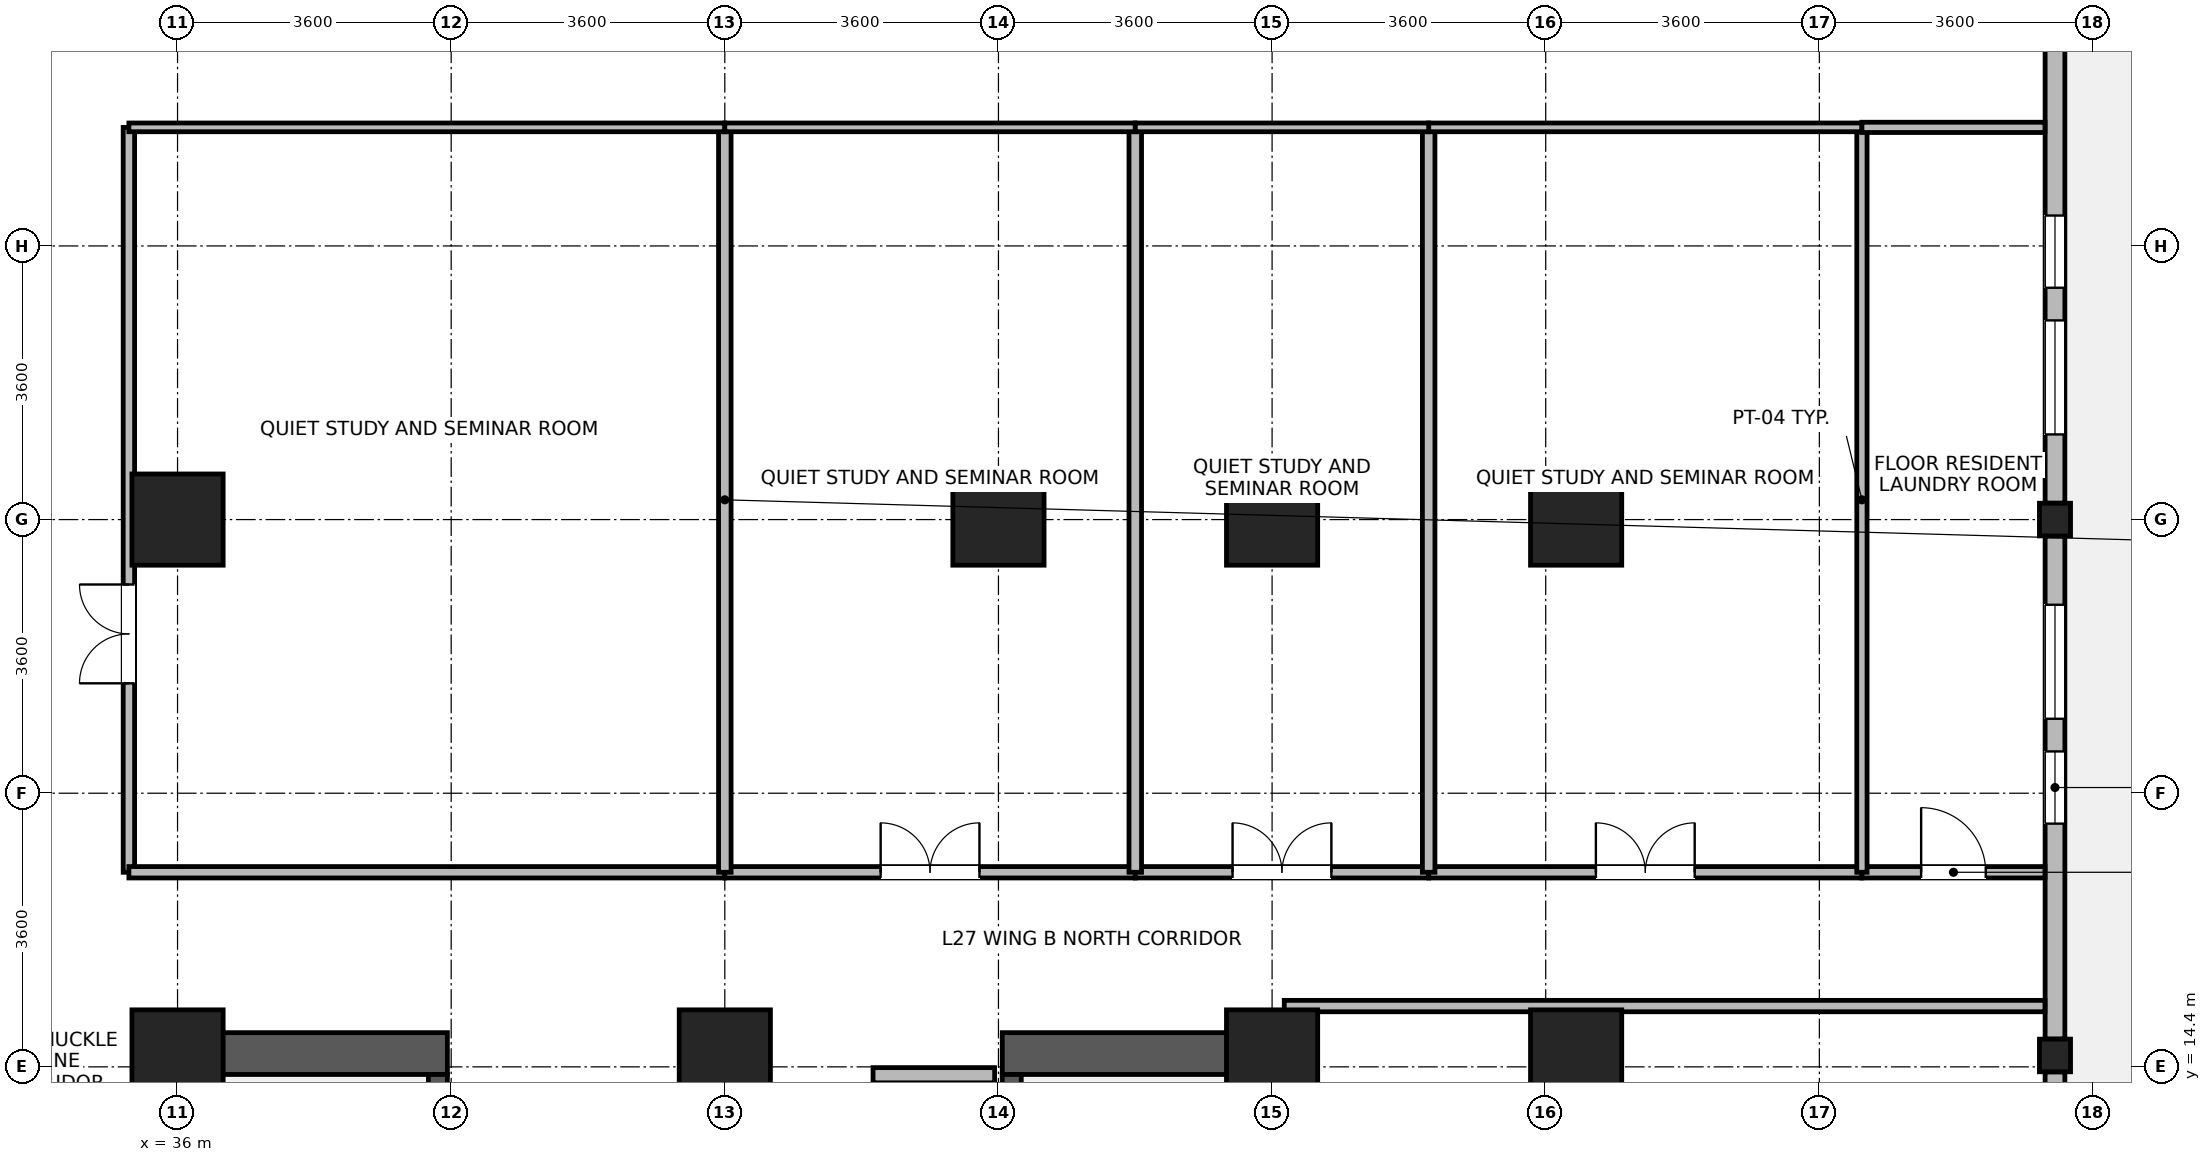
"""IFC4 building model, lengths in metres.
Left out: names, types, materials, properties, quantities, classifications, styles, units other than length and angle.
Written with IfcOpenShell. Run it as: python <this file> out.ifc"""

import sys

from ifc_helpers import new_model, si_unit, direction, frame, frame_2d, origin, origin_2d, place, context, subcontext, project, spatial, rectangle, i_section, extrude, source, transform, mapped, element, fill, save


model = new_model("IFC4")
c1 = context("Model", 3, precision=1e-05, world=origin(), true_north=direction((0.0, 1.0)))
c2 = subcontext(c1, "Body", "Model", "MODEL_VIEW")
j1 = project(units=[si_unit("LENGTHUNIT", "METRE"), si_unit("PLANEANGLEUNIT", "RADIAN")], contexts=[c1])
p1 = place(None, origin())
s1 = spatial("IfcSite", under=j1, at=p1, CompositionType="ELEMENT")
p2 = place(p1, origin())
s2 = spatial("IfcBuilding", under=s1, at=p2, CompositionType="ELEMENT")
p3 = place(p2, frame((0.0, 0.0, 108.2)))
s3 = spatial("IfcBuildingStorey", under=s2, at=p3, CompositionType="ELEMENT", Elevation=108.2)
for number, where, z_axis, x_axis in (
    (1, (36.075, 6.75, 0.0), (0.0, 0.0, 1.0), (0.0, 1.0, 0.0)),
    (2, (50.325, 6.75, 0.0), (0.0, 0.0, 1.0), (0.0, 1.0, 0.0)),
):
    element("IfcWall", number, at=place(p3, frame(where, z_axis=z_axis, x_axis=x_axis)), inside=s3, PredefinedType="SHEAR", context=c2, shape_type="SweptSolid", body=[
        extrude(rectangle(XDim=8.1, YDim=0.55, at=frame_2d((4.05, 0.0))), origin(), (0.0, 0.0, 1.0), 3.45),
    ])
for number, where, z_axis, x_axis in (
    (3, (36.35, 14.575, 0.0), (0.0, 0.0, 1.0), (1.0, 0.0, 0.0)),
    (4, (46.85, 14.575, 0.0), (0.0, 0.0, 1.0), (1.0, 0.0, 0.0)),
):
    element("IfcWall", number, at=place(p3, frame(where, z_axis=z_axis, x_axis=x_axis)), inside=s3, PredefinedType="SHEAR", context=c2, shape_type="SweptSolid", body=[
        extrude(rectangle(XDim=3.2, YDim=0.55, at=frame_2d((1.6, 0.0))), origin(), (0.0, 0.0, 1.0), 3.45),
    ])
p4 = place(p3, frame((39.425, 7.3, 0.0), z_axis=(0.0, 0.0, 1.0), x_axis=(0.0, 1.0, 0.0)))
e5 = element("IfcWall", 5, at=p4, inside=s3, PredefinedType="SHEAR", context=c2, shape_type="SweptSolid", body=[
    extrude(rectangle(XDim=7.0, YDim=0.25, at=frame_2d((3.5, 0.0))), origin(), (0.0, 0.0, 1.0), 3.45),
])
p5 = place(p4, frame((0.15, 0.0, 0.0)))
e6 = element("IfcOpeningElement", 6, at=p5, cuts=e5, PredefinedType="OPENING", context=c2, shape_type="SweptSolid", body=[
    extrude(rectangle(XDim=1.1, YDim=2.08, at=frame_2d((0.55, 1.04))), frame((0.0, 0.135, 0.0), z_axis=(0.0, -1.0, 0.0), x_axis=(1.0, 0.0, 0.0)), (0.0, 0.0, 1.0), 0.27),
])
p6 = place(p3, frame((46.975, 7.3, 0.0), z_axis=(0.0, 0.0, 1.0), x_axis=(0.0, 1.0, 0.0)))
e7 = element("IfcWall", 7, at=p6, inside=s3, PredefinedType="SHEAR", context=c2, shape_type="SweptSolid", body=[
    extrude(rectangle(XDim=7.0, YDim=0.25, at=frame_2d((3.5, 0.0))), origin(), (0.0, 0.0, 1.0), 3.45),
])
p7 = place(p6, frame((0.15, 0.0, 0.0)))
e8 = element("IfcOpeningElement", 8, at=p7, cuts=e7, PredefinedType="OPENING", context=c2, shape_type="SweptSolid", body=[
    extrude(rectangle(XDim=1.1, YDim=2.08, at=frame_2d((0.55, 1.04))), frame((0.0, 0.135, 0.0), z_axis=(0.0, -1.0, 0.0), x_axis=(1.0, 0.0, 0.0)), (0.0, 0.0, 1.0), 0.27),
])
m1 = source(origin(), c2, "Body", "SweptSolid", [
    extrude(rectangle(XDim=1.2, YDim=1.2, at=origin_2d()), origin(), (0.0, 0.0, 1.0), 3.7),
])
for number, where, z_axis, x_axis in (
    (9, (36.0, 21.6, 0.0), (0.0, 0.0, 1.0), (1.0, 0.0, 0.0)),
    (10, (46.8, 21.6, 0.0), (0.0, 0.0, 1.0), (1.0, 0.0, 0.0)),
    (11, (36.0, 14.55, 0.0), (0.0, 0.0, 1.0), (1.0, 0.0, 0.0)),
    (12, (43.2, 14.55, 0.0), (0.0, 0.0, 1.0), (1.0, 0.0, 0.0)),
    (13, (50.4, 14.55, 0.0), (0.0, 0.0, 1.0), (1.0, 0.0, 0.0)),
    (14, (50.4, 21.6, 0.0), (0.0, 0.0, 1.0), (1.0, 0.0, 0.0)),
    (15, (54.4, 14.55, 0.0), (0.0, 0.0, 1.0), (1.0, 0.0, 0.0)),
    (16, (54.4, 21.6, 0.0), (0.0, 0.0, 1.0), (1.0, 0.0, 0.0)),
):
    element("IfcColumn", number, at=place(p3, frame(where, z_axis=z_axis, x_axis=x_axis)), inside=s3, PredefinedType="COLUMN", context=c2, shape_type="MappedRepresentation", body=[
        mapped(m1, transform((0.0, 0.0, 0.0), x_axis=(1.0, 0.0, 0.0), y_axis=(0.0, 1.0, 0.0), z_axis=(0.0, 0.0, 1.0), scale=1.0)),
    ])
m2 = source(origin(), c2, "Body", "SweptSolid", [
    extrude(i_section(OverallWidth=0.409, OverallDepth=0.43, WebThickness=0.024, FlangeThickness=0.033, FilletRadius=0.015, at=origin_2d()), origin(), (0.0, 0.0, 1.0), 3.7),
])
for number, where, z_axis, x_axis in (
    (17, (60.7, 14.55, 0.0), (0.0, 0.0, 1.0), (1.0, 0.0, 0.0)),
    (18, (60.7, 21.6, 0.0), (0.0, 0.0, 1.0), (1.0, 0.0, 0.0)),
):
    element("IfcColumn", number, at=place(p3, frame(where, z_axis=z_axis, x_axis=x_axis)), inside=s3, PredefinedType="COLUMN", context=c2, shape_type="MappedRepresentation", body=[
        mapped(m2, transform((0.0, 0.0, 0.0), x_axis=(1.0, 0.0, 0.0), y_axis=(0.0, 1.0, 0.0), z_axis=(0.0, 0.0, 1.0), scale=1.0)),
    ])
p8 = place(p3, frame((60.7, 14.334, 0.0), z_axis=(0.0, 0.0, 1.0), x_axis=(0.0, -1.0, 0.0)))
e19 = element("IfcWall", 19, at=p8, inside=s3, PredefinedType="STANDARD", context=c2, shape_type="SweptSolid", body=[
    extrude(rectangle(XDim=7.068, YDim=0.26, at=frame_2d((3.534, 0.0))), origin(), (0.0, 0.0, 1.0), 2.98),
])
p9 = place(p8, frame((2.784, 0.0, 0.0)))
e20 = element("IfcOpeningElement", 20, at=p9, cuts=e19, PredefinedType="OPENING", context=c2, shape_type="SweptSolid", body=[
    extrude(rectangle(XDim=1.5, YDim=2.15, at=frame_2d((0.75, 1.075))), frame((0.0, 0.14, 0.0), z_axis=(0.0, -1.0, 0.0), x_axis=(1.0, 0.0, 0.0)), (0.0, 0.0, 1.0), 0.28),
])
p10 = place(p8, frame((1.017, 0.0, 0.85)))
e21 = element("IfcOpeningElement", 21, at=p10, cuts=e19, PredefinedType="OPENING", context=c2, shape_type="SweptSolid", body=[
    extrude(rectangle(XDim=1.5, YDim=1.85, at=frame_2d((0.75, 0.925))), frame((0.0, 0.14, 0.0), z_axis=(0.0, -1.0, 0.0), x_axis=(1.0, 0.0, 0.0)), (0.0, 0.0, 1.0), 0.28),
])
p11 = place(p8, frame((4.551, 0.0, 0.85)))
e22 = element("IfcOpeningElement", 22, at=p11, cuts=e19, PredefinedType="OPENING", context=c2, shape_type="SweptSolid", body=[
    extrude(rectangle(XDim=1.5, YDim=1.85, at=frame_2d((0.75, 0.925))), frame((0.0, 0.14, 0.0), z_axis=(0.0, -1.0, 0.0), x_axis=(1.0, 0.0, 0.0)), (0.0, 0.0, 1.0), 0.28),
])
p12 = place(p3, frame((60.7, 21.384, 0.0), z_axis=(0.0, 0.0, 1.0), x_axis=(0.0, -1.0, 0.0)))
e23 = element("IfcWall", 23, at=p12, inside=s3, PredefinedType="STANDARD", context=c2, shape_type="SweptSolid", body=[
    extrude(rectangle(XDim=6.618, YDim=0.26, at=frame_2d((3.309, 0.0))), origin(), (0.0, 0.0, 1.0), 2.98),
])
p13 = place(p12, frame((0.905, 0.0, 0.85)))
e24 = element("IfcOpeningElement", 24, at=p13, cuts=e23, PredefinedType="OPENING", context=c2, shape_type="SweptSolid", body=[
    extrude(rectangle(XDim=1.5, YDim=1.85, at=frame_2d((0.75, 0.925))), frame((0.0, 0.14, 0.0), z_axis=(0.0, -1.0, 0.0), x_axis=(1.0, 0.0, 0.0)), (0.0, 0.0, 1.0), 0.28),
])
p14 = place(p12, frame((2.834, 0.0, 0.85)))
e25 = element("IfcOpeningElement", 25, at=p14, cuts=e23, PredefinedType="OPENING", context=c2, shape_type="SweptSolid", body=[
    extrude(rectangle(XDim=0.95, YDim=1.75, at=frame_2d((0.475, 0.875))), frame((0.0, 0.14, 0.0), z_axis=(0.0, -1.0, 0.0), x_axis=(1.0, 0.0, 0.0)), (0.0, 0.0, 1.0), 0.28),
])
p15 = place(p3, frame((60.7, 28.434, 0.0), z_axis=(0.0, 0.0, 1.0), x_axis=(0.0, -1.0, 0.0)))
e26 = element("IfcWall", 26, at=p15, inside=s3, PredefinedType="STANDARD", context=c2, shape_type="SweptSolid", body=[
    extrude(rectangle(XDim=6.618, YDim=0.26, at=frame_2d((3.309, 0.0))), origin(), (0.0, 0.0, 1.0), 2.98),
])
p16 = place(p15, frame((4.213, 0.0, 0.85)))
e27 = element("IfcOpeningElement", 27, at=p16, cuts=e26, PredefinedType="OPENING", context=c2, shape_type="SweptSolid", body=[
    extrude(rectangle(XDim=1.5, YDim=1.85, at=frame_2d((0.75, 0.925))), frame((0.0, 0.14, 0.0), z_axis=(0.0, -1.0, 0.0), x_axis=(1.0, 0.0, 0.0)), (0.0, 0.0, 1.0), 0.28),
])
p17 = place(p15, frame((2.834, 0.0, 0.85)))
e28 = element("IfcOpeningElement", 28, at=p17, cuts=e26, PredefinedType="OPENING", context=c2, shape_type="SweptSolid", body=[
    extrude(rectangle(XDim=0.95, YDim=1.75, at=frame_2d((0.475, 0.875))), frame((0.0, 0.14, 0.0), z_axis=(0.0, -1.0, 0.0), x_axis=(1.0, 0.0, 0.0)), (0.0, 0.0, 1.0), 0.28),
])
p18 = place(p3, frame((45.15, 14.29, 0.0), z_axis=(0.0, 0.0, 1.0), x_axis=(1.0, 0.0, 0.0)))
e29 = element("IfcWall", 29, at=p18, inside=s3, PredefinedType="PARTITIONING", context=c2, shape_type="SweptSolid", body=[
    extrude(rectangle(XDim=1.6, YDim=0.2, at=frame_2d((0.8, 0.0))), origin(), (0.0, 0.0, 1.0), 2.43),
])
p19 = place(p3, frame((50.56, 15.2, 0.0), z_axis=(0.0, 0.0, 1.0), x_axis=(1.0, 0.0, 0.0)))
e30 = element("IfcWall", 30, at=p19, inside=s3, PredefinedType="PARTITIONING", context=c2, shape_type="SweptSolid", body=[
    extrude(rectangle(XDim=10.008, YDim=0.15, at=frame_2d((5.004, 0.0))), origin(), (0.0, 0.0, 1.0), 3.43),
])
p20 = place(p3, frame((35.36, 16.96, 0.0), z_axis=(0.0, 0.0, 1.0), x_axis=(0.0, 1.0, 0.0)))
e31 = element("IfcWall", 31, at=p20, inside=s3, PredefinedType="PARTITIONING", context=c2, shape_type="SweptSolid", body=[
    extrude(rectangle(XDim=9.8, YDim=0.15, at=frame_2d((4.9, 0.0))), origin(), (0.0, 0.0, 1.0), 3.43),
])
p21 = place(p20, frame((2.486, 0.0, 0.0)))
e32 = element("IfcOpeningElement", 32, at=p21, cuts=e31, PredefinedType="OPENING", context=c2, shape_type="SweptSolid", body=[
    extrude(rectangle(XDim=1.3, YDim=2.12, at=frame_2d((0.65, 1.06))), frame((0.0, 0.085, 0.0), z_axis=(0.0, -1.0, 0.0), x_axis=(1.0, 0.0, 0.0)), (0.0, 0.0, 1.0), 0.17),
])
p22 = place(p3, frame((35.36, 16.96, 0.0), z_axis=(0.0, 0.0, 1.0), x_axis=(1.0, 0.0, 0.0)))
e33 = element("IfcWall", 33, at=p22, inside=s3, PredefinedType="PARTITIONING", context=c2, shape_type="SweptSolid", body=[
    extrude(rectangle(XDim=7.84, YDim=0.15, at=frame_2d((3.92, 0.0))), origin(), (0.0, 0.0, 1.0), 3.43),
])
p23 = place(p3, frame((52.46, 16.96, 0.0), z_axis=(0.0, 0.0, 1.0), x_axis=(1.0, 0.0, 0.0)))
e34 = element("IfcWall", 34, at=p23, inside=s3, PredefinedType="PARTITIONING", context=c2, shape_type="SweptSolid", body=[
    extrude(rectangle(XDim=5.7, YDim=0.15, at=frame_2d((2.85, 0.0))), origin(), (0.0, 0.0, 1.0), 3.43),
])
p24 = place(p23, frame((2.2, 0.0, 0.0)))
e35 = element("IfcOpeningElement", 35, at=p24, cuts=e34, PredefinedType="OPENING", context=c2, shape_type="SweptSolid", body=[
    extrude(rectangle(XDim=1.3, YDim=2.12, at=frame_2d((0.65, 1.06))), frame((0.0, 0.085, 0.0), z_axis=(0.0, -1.0, 0.0), x_axis=(1.0, 0.0, 0.0)), (0.0, 0.0, 1.0), 0.17),
])
p25 = place(p3, frame((43.2, 16.96, 0.0), z_axis=(0.0, 0.0, 1.0), x_axis=(1.0, 0.0, 0.0)))
e36 = element("IfcWall", 36, at=p25, inside=s3, PredefinedType="PARTITIONING", context=c2, shape_type="SweptSolid", body=[
    extrude(rectangle(XDim=5.4, YDim=0.15, at=frame_2d((2.7, 0.0))), origin(), (0.0, 0.0, 1.0), 3.43),
])
p26 = place(p25, frame((2.05, 0.0, 0.0)))
e37 = element("IfcOpeningElement", 37, at=p26, cuts=e36, PredefinedType="OPENING", context=c2, shape_type="SweptSolid", body=[
    extrude(rectangle(XDim=1.3, YDim=2.12, at=frame_2d((0.65, 1.06))), frame((0.0, 0.085, 0.0), z_axis=(0.0, -1.0, 0.0), x_axis=(1.0, 0.0, 0.0)), (0.0, 0.0, 1.0), 0.17),
])
p27 = place(p3, frame((48.6, 16.96, 0.0), z_axis=(0.0, 0.0, 1.0), x_axis=(1.0, 0.0, 0.0)))
e38 = element("IfcWall", 38, at=p27, inside=s3, PredefinedType="PARTITIONING", context=c2, shape_type="SweptSolid", body=[
    extrude(rectangle(XDim=3.86, YDim=0.15, at=frame_2d((1.93, 0.0))), origin(), (0.0, 0.0, 1.0), 3.43),
])
p28 = place(p27, frame((1.28, 0.0, 0.0)))
e39 = element("IfcOpeningElement", 39, at=p28, cuts=e38, PredefinedType="OPENING", context=c2, shape_type="SweptSolid", body=[
    extrude(rectangle(XDim=1.3, YDim=2.12, at=frame_2d((0.65, 1.06))), frame((0.0, 0.085, 0.0), z_axis=(0.0, -1.0, 0.0), x_axis=(1.0, 0.0, 0.0)), (0.0, 0.0, 1.0), 0.17),
])
p29 = place(p3, frame((58.16, 16.96, 0.0), z_axis=(0.0, 0.0, 1.0), x_axis=(1.0, 0.0, 0.0)))
e40 = element("IfcWall", 40, at=p29, inside=s3, PredefinedType="PARTITIONING", context=c2, shape_type="SweptSolid", body=[
    extrude(rectangle(XDim=2.408, YDim=0.15, at=frame_2d((1.204, 0.0))), origin(), (0.0, 0.0, 1.0), 3.43),
])
p30 = place(p29, frame((0.779, 0.0, 0.0)))
e41 = element("IfcOpeningElement", 41, at=p30, cuts=e40, PredefinedType="OPENING", context=c2, shape_type="SweptSolid", body=[
    extrude(rectangle(XDim=0.85, YDim=2.04, at=frame_2d((0.425, 1.02))), frame((0.0, 0.085, 0.0), z_axis=(0.0, -1.0, 0.0), x_axis=(1.0, 0.0, 0.0)), (0.0, 0.0, 1.0), 0.17),
])
for number, where, z_axis, x_axis in (
    (42, (43.2, 16.96, 0.0), (0.0, 0.0, 1.0), (0.0, 1.0, 0.0)),
    (43, (48.6, 16.96, 0.0), (0.0, 0.0, 1.0), (0.0, 1.0, 0.0)),
    (44, (52.46, 16.96, 0.0), (0.0, 0.0, 1.0), (0.0, 1.0, 0.0)),
):
    element("IfcWall", number, at=place(p3, frame(where, z_axis=z_axis, x_axis=x_axis)), inside=s3, PredefinedType="PARTITIONING", context=c2, shape_type="SweptSolid", body=[
        extrude(rectangle(XDim=9.8, YDim=0.165, at=frame_2d((4.9, 0.0))), origin(), (0.0, 0.0, 1.0), 3.43),
    ])
p31 = place(p3, frame((58.16, 16.96, 0.0), z_axis=(0.0, 0.0, 1.0), x_axis=(0.0, 1.0, 0.0)))
e45 = element("IfcWall", 45, at=p31, inside=s3, PredefinedType="PARTITIONING", context=c2, shape_type="SweptSolid", body=[
    extrude(rectangle(XDim=9.8, YDim=0.135, at=frame_2d((4.9, 0.0))), origin(), (0.0, 0.0, 1.0), 3.43),
])
p32 = place(p3, frame((35.36, 26.76, 0.0), z_axis=(0.0, 0.0, 1.0), x_axis=(1.0, 0.0, 0.0)))
e46 = element("IfcWall", 46, at=p32, inside=s3, PredefinedType="PARTITIONING", context=c2, shape_type="SweptSolid", body=[
    extrude(rectangle(XDim=7.84, YDim=0.115, at=frame_2d((3.92, 0.0))), origin(), (0.0, 0.0, 1.0), 3.43),
])
p33 = place(p3, frame((52.46, 26.76, 0.0), z_axis=(0.0, 0.0, 1.0), x_axis=(1.0, 0.0, 0.0)))
e47 = element("IfcWall", 47, at=p33, inside=s3, PredefinedType="PARTITIONING", context=c2, shape_type="SweptSolid", body=[
    extrude(rectangle(XDim=5.7, YDim=0.115, at=frame_2d((2.85, 0.0))), origin(), (0.0, 0.0, 1.0), 3.43),
])
p34 = place(p3, frame((43.2, 26.76, 0.0), z_axis=(0.0, 0.0, 1.0), x_axis=(1.0, 0.0, 0.0)))
e48 = element("IfcWall", 48, at=p34, inside=s3, PredefinedType="PARTITIONING", context=c2, shape_type="SweptSolid", body=[
    extrude(rectangle(XDim=5.4, YDim=0.115, at=frame_2d((2.7, 0.0))), origin(), (0.0, 0.0, 1.0), 3.43),
])
p35 = place(p3, frame((48.6, 26.76, 0.0), z_axis=(0.0, 0.0, 1.0), x_axis=(1.0, 0.0, 0.0)))
e49 = element("IfcWall", 49, at=p35, inside=s3, PredefinedType="PARTITIONING", context=c2, shape_type="SweptSolid", body=[
    extrude(rectangle(XDim=3.86, YDim=0.115, at=frame_2d((1.93, 0.0))), origin(), (0.0, 0.0, 1.0), 3.43),
])
p36 = place(p3, frame((58.16, 26.76, 0.0), z_axis=(0.0, 0.0, 1.0), x_axis=(1.0, 0.0, 0.0)))
e50 = element("IfcWall", 50, at=p36, inside=s3, PredefinedType="PARTITIONING", context=c2, shape_type="SweptSolid", body=[
    extrude(rectangle(XDim=2.408, YDim=0.135, at=frame_2d((1.204, 0.0))), origin(), (0.0, 0.0, 1.0), 3.43),
])
p37 = place(p13, origin())
e51 = element("IfcWindow", 51, at=p37, inside=s3, PartitioningType="SINGLE_PANEL", PredefinedType="WINDOW", context=c2, shape_type="SweptSolid", body=[
    extrude(rectangle(XDim=1.5, YDim=1.85, at=frame_2d((0.75, 0.925))), frame((0.0, 0.03, 0.0), z_axis=(0.0, -1.0, 0.0), x_axis=(1.0, 0.0, 0.0)), (0.0, 0.0, 1.0), 0.06),
])
fill(e24, e51)
p38 = place(p14, origin())
e52 = element("IfcWindow", 52, at=p38, inside=s3, PartitioningType="SINGLE_PANEL", PredefinedType="WINDOW", context=c2, shape_type="SweptSolid", body=[
    extrude(rectangle(XDim=0.95, YDim=1.75, at=frame_2d((0.475, 0.875))), frame((0.0, 0.03, 0.0), z_axis=(0.0, -1.0, 0.0), x_axis=(1.0, 0.0, 0.0)), (0.0, 0.0, 1.0), 0.06),
])
fill(e25, e52)
p39 = place(p16, origin())
e53 = element("IfcWindow", 53, at=p39, inside=s3, PartitioningType="SINGLE_PANEL", PredefinedType="WINDOW", context=c2, shape_type="SweptSolid", body=[
    extrude(rectangle(XDim=1.5, YDim=1.85, at=frame_2d((0.75, 0.925))), frame((0.0, 0.03, 0.0), z_axis=(0.0, -1.0, 0.0), x_axis=(1.0, 0.0, 0.0)), (0.0, 0.0, 1.0), 0.06),
])
fill(e27, e53)
p40 = place(p17, origin())
e54 = element("IfcWindow", 54, at=p40, inside=s3, PartitioningType="SINGLE_PANEL", PredefinedType="WINDOW", context=c2, shape_type="SweptSolid", body=[
    extrude(rectangle(XDim=0.95, YDim=1.75, at=frame_2d((0.475, 0.875))), frame((0.0, 0.03, 0.0), z_axis=(0.0, -1.0, 0.0), x_axis=(1.0, 0.0, 0.0)), (0.0, 0.0, 1.0), 0.06),
])
fill(e28, e54)
p41 = place(p21, origin())
e55 = element("IfcDoor", 55, at=p41, inside=s3, OperationType="DOUBLE_DOOR_SINGLE_SWING", PredefinedType="DOOR", context=c2, shape_type="SweptSolid", body=[
    extrude(rectangle(XDim=1.3, YDim=2.12, at=frame_2d((0.65, 1.06))), frame((0.0, 0.025, 0.0), z_axis=(0.0, -1.0, 0.0), x_axis=(1.0, 0.0, 0.0)), (0.0, 0.0, 1.0), 0.05),
])
fill(e32, e55)
p42 = place(p24, origin())
e56 = element("IfcDoor", 56, at=p42, inside=s3, OperationType="DOUBLE_DOOR_SINGLE_SWING", PredefinedType="DOOR", context=c2, shape_type="SweptSolid", body=[
    extrude(rectangle(XDim=1.3, YDim=2.12, at=frame_2d((0.65, 1.06))), frame((0.0, 0.025, 0.0), z_axis=(0.0, -1.0, 0.0), x_axis=(1.0, 0.0, 0.0)), (0.0, 0.0, 1.0), 0.05),
])
fill(e35, e56)
p43 = place(p26, origin())
e57 = element("IfcDoor", 57, at=p43, inside=s3, OperationType="DOUBLE_DOOR_SINGLE_SWING", PredefinedType="DOOR", context=c2, shape_type="SweptSolid", body=[
    extrude(rectangle(XDim=1.3, YDim=2.12, at=frame_2d((0.65, 1.06))), frame((0.0, 0.025, 0.0), z_axis=(0.0, -1.0, 0.0), x_axis=(1.0, 0.0, 0.0)), (0.0, 0.0, 1.0), 0.05),
])
fill(e37, e57)
p44 = place(p28, origin())
e58 = element("IfcDoor", 58, at=p44, inside=s3, OperationType="DOUBLE_DOOR_SINGLE_SWING", PredefinedType="DOOR", context=c2, shape_type="SweptSolid", body=[
    extrude(rectangle(XDim=1.3, YDim=2.12, at=frame_2d((0.65, 1.06))), frame((0.0, 0.025, 0.0), z_axis=(0.0, -1.0, 0.0), x_axis=(1.0, 0.0, 0.0)), (0.0, 0.0, 1.0), 0.05),
])
fill(e39, e58)
p45 = place(p30, origin())
e59 = element("IfcDoor", 59, at=p45, inside=s3, OperationType="SINGLE_SWING_LEFT", PredefinedType="DOOR", context=c2, shape_type="SweptSolid", body=[
    extrude(rectangle(XDim=0.85, YDim=2.04, at=frame_2d((0.425, 1.02))), frame((0.0, 0.025, 0.0), z_axis=(0.0, -1.0, 0.0), x_axis=(1.0, 0.0, 0.0)), (0.0, 0.0, 1.0), 0.05),
])
fill(e41, e59)
save(model, sys.argv[1])
